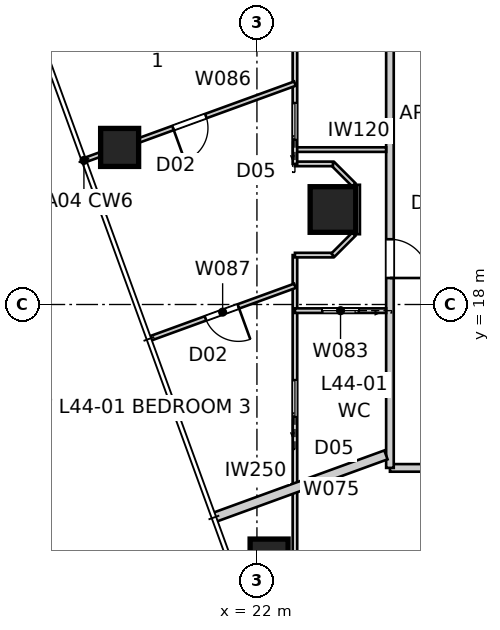
"""IFC4 building model, lengths in metres.
Left out: names, types, materials, properties, quantities, classifications, styles, units other than length and angle.
Written with IfcOpenShell. Run it as: python <this file> out.ifc"""

import sys

from ifc_helpers import new_model, si_unit, direction, frame, frame_2d, origin, origin_2d, place, context, subcontext, project, spatial, rectangle, extrude, element, fill, save


model = new_model("IFC4")
c1 = context("Model", 3, precision=1e-05, world=origin(), true_north=direction((0.0, 1.0)))
c2 = subcontext(c1, "Body", "Model", "MODEL_VIEW")
j1 = project(units=[si_unit("LENGTHUNIT", "METRE"), si_unit("PLANEANGLEUNIT", "RADIAN")], contexts=[c1])
p1 = place(None, origin())
s1 = spatial("IfcSite", under=j1, at=p1, CompositionType="ELEMENT")
p2 = place(p1, origin())
s2 = spatial("IfcBuilding", under=s1, at=p2, CompositionType="ELEMENT")
p3 = place(p2, frame((0.0, 0.0, 160.8)))
s3 = spatial("IfcBuildingStorey", under=s2, at=p3, CompositionType="ELEMENT", Elevation=160.8)
for number, where, z_axis, x_axis in (
    (1, (18.387, 22.134, 0.0), (0.0, 0.0, 1.0), (1.0, 0.0, 0.0)),
    (2, (22.32, 11.327, 0.0), (0.0, 0.0, 1.0), (1.0, 0.0, 0.0)),
):
    element("IfcColumn", number, at=place(p3, frame(where, z_axis=z_axis, x_axis=x_axis)), inside=s3, PredefinedType="COLUMN", context=c2, shape_type="SweptSolid", body=[
        extrude(rectangle(XDim=1.0, YDim=1.0, at=origin_2d()), origin(), (0.0, 0.0, 1.0), 3.4),
    ])
p4 = place(p3, frame((24.0, 20.5, 0.0), z_axis=(0.0, 0.0, 1.0), x_axis=(1.0, 0.0, 0.0)))
e3 = element("IfcColumn", 3, at=p4, inside=s3, PredefinedType="COLUMN", context=c2, shape_type="SweptSolid", body=[
    extrude(rectangle(XDim=1.2, YDim=1.2, at=origin_2d()), origin(), (0.0, 0.0, 1.0), 3.4),
])
p5 = place(p3, frame((25.5, 13.7, 0.0), z_axis=(0.0, 0.0, 1.0), x_axis=(1.0, 0.0, 0.0)))
e4 = element("IfcWall", 4, at=p5, inside=s3, PredefinedType="PARTITIONING", context=c2, shape_type="SweptSolid", body=[
    extrude(rectangle(XDim=5.258, YDim=0.2, at=frame_2d((2.629, 0.0))), origin(), (0.0, 0.0, 1.0), 3.25),
])
p6 = place(p5, frame((2.646, 0.0, 0.0)))
e5 = element("IfcOpeningElement", 5, at=p6, cuts=e4, PredefinedType="OPENING", context=c2, shape_type="SweptSolid", body=[
    extrude(rectangle(XDim=1.02, YDim=2.34, at=frame_2d((0.51, 1.17))), frame((0.0, 0.11, 0.0), z_axis=(0.0, -1.0, 0.0), x_axis=(1.0, 0.0, 0.0)), (0.0, 0.0, 1.0), 0.22),
])
p7 = place(p3, frame((25.5, 47.1, 0.0), z_axis=(0.0, 0.0, 1.0), x_axis=(0.0, -1.0, 0.0)))
e6 = element("IfcWall", 6, at=p7, inside=s3, PredefinedType="PARTITIONING", context=c2, shape_type="SweptSolid", body=[
    extrude(rectangle(XDim=33.4, YDim=0.2, at=frame_2d((16.7, 0.0))), origin(), (0.0, 0.0, 1.0), 3.25),
])
p8 = place(p7, frame((2.52, 0.0, 0.0)))
e7 = element("IfcOpeningElement", 7, at=p8, cuts=e6, PredefinedType="OPENING", context=c2, shape_type="SweptSolid", body=[
    extrude(rectangle(XDim=1.02, YDim=2.34, at=frame_2d((0.51, 1.17))), frame((0.0, 0.11, 0.0), z_axis=(0.0, -1.0, 0.0), x_axis=(1.0, 0.0, 0.0)), (0.0, 0.0, 1.0), 0.22),
])
p9 = place(p7, frame((27.383, 0.0, 0.0)))
e8 = element("IfcOpeningElement", 8, at=p9, cuts=e6, PredefinedType="OPENING", context=c2, shape_type="SweptSolid", body=[
    extrude(rectangle(XDim=1.02, YDim=2.1, at=frame_2d((0.51, 1.05))), frame((0.0, 0.11, 0.0), z_axis=(0.0, -1.0, 0.0), x_axis=(1.0, 0.0, 0.0)), (0.0, 0.0, 1.0), 0.22),
])
p10 = place(p3, frame((20.868, 12.395, 0.0), z_axis=(0.0, 0.0, 1.0), x_axis=(0.939677962656, 0.342060413521, 0.0)))
e9 = element("IfcWall", 9, at=p10, inside=s3, PredefinedType="PARTITIONING", context=c2, shape_type="SweptSolid", body=[
    extrude(rectangle(XDim=4.818, YDim=0.25, at=frame_2d((2.409, 0.0))), origin(), (0.0, 0.0, 1.0), 3.25),
])
p11 = place(p3, frame((23.0, 22.076, 0.0), z_axis=(0.0, 0.0, 1.0), x_axis=(1.0, 0.0, 0.0)))
e10 = element("IfcWall", 10, at=p11, inside=s3, PredefinedType="PARTITIONING", context=c2, shape_type="SweptSolid", body=[
    extrude(rectangle(XDim=2.4, YDim=0.12, at=frame_2d((1.2, 0.0))), origin(), (0.0, 0.0, 1.0), 3.25),
])
p12 = place(p3, frame((23.0, 11.2, 0.0), z_axis=(0.0, 0.0, 1.0), x_axis=(0.0, 1.0, 0.0)))
e11 = element("IfcWall", 11, at=p12, inside=s3, PredefinedType="PARTITIONING", context=c2, shape_type="SweptSolid", body=[
    extrude(rectangle(XDim=8.1, YDim=0.12, at=frame_2d((4.05, 0.0))), origin(), (0.0, 0.0, 1.0), 3.25),
])
p13 = place(p12, frame((3.849, 0.0, 0.0)))
e12 = element("IfcOpeningElement", 12, at=p13, cuts=e11, PredefinedType="OPENING", context=c2, shape_type="SweptSolid", body=[
    extrude(rectangle(XDim=0.96, YDim=2.1, at=frame_2d((0.48, 1.05))), frame((0.0, 0.07, 0.0), z_axis=(0.0, -1.0, 0.0), x_axis=(1.0, 0.0, 0.0)), (0.0, 0.0, 1.0), 0.14),
])
p14 = place(p3, frame((23.0, 19.3, 0.0), z_axis=(0.0, 0.0, 1.0), x_axis=(1.0, 0.0, 0.0)))
e13 = element("IfcWall", 13, at=p14, inside=s3, PredefinedType="PARTITIONING", context=c2, shape_type="SweptSolid", body=[
    extrude(rectangle(XDim=1.0, YDim=0.12, at=frame_2d((0.5, 0.0))), origin(), (0.0, 0.0, 1.0), 3.25),
])
p15 = place(p3, frame((24.0, 19.3, 0.0), z_axis=(0.0, 0.0, 1.0), x_axis=(0.707106781187, 0.707106781187, 0.0)))
e14 = element("IfcWall", 14, at=p15, inside=s3, PredefinedType="PARTITIONING", context=c2, shape_type="SweptSolid", body=[
    extrude(rectangle(XDim=0.778, YDim=0.12, at=frame_2d((0.389, 0.0))), origin(), (0.0, 0.0, 1.0), 3.25),
])
p16 = place(p3, frame((24.65, 19.85, 0.0), z_axis=(0.0, 0.0, 1.0), x_axis=(0.0, 1.0, 0.0)))
e15 = element("IfcWall", 15, at=p16, inside=s3, PredefinedType="PARTITIONING", context=c2, shape_type="SweptSolid", body=[
    extrude(rectangle(XDim=1.3, YDim=0.12, at=frame_2d((0.65, 0.0))), origin(), (0.0, 0.0, 1.0), 3.25),
])
p17 = place(p3, frame((24.55, 21.15, 0.0), z_axis=(0.0, 0.0, 1.0), x_axis=(-0.707106781187, 0.707106781187, 0.0)))
e16 = element("IfcWall", 16, at=p17, inside=s3, PredefinedType="PARTITIONING", context=c2, shape_type="SweptSolid", body=[
    extrude(rectangle(XDim=0.778, YDim=0.12, at=frame_2d((0.389, 0.0))), origin(), (0.0, 0.0, 1.0), 3.25),
])
p18 = place(p3, frame((24.0, 21.7, 0.0), z_axis=(0.0, 0.0, 1.0), x_axis=(-1.0, 0.0, 0.0)))
e17 = element("IfcWall", 17, at=p18, inside=s3, PredefinedType="PARTITIONING", context=c2, shape_type="SweptSolid", body=[
    extrude(rectangle(XDim=1.0, YDim=0.12, at=frame_2d((0.5, 0.0))), origin(), (0.0, 0.0, 1.0), 3.25),
])
p19 = place(p3, frame((23.0, 21.7, 0.0), z_axis=(0.0, 0.0, 1.0), x_axis=(0.0, 1.0, 0.0)))
e18 = element("IfcWall", 18, at=p19, inside=s3, PredefinedType="PARTITIONING", context=c2, shape_type="SweptSolid", body=[
    extrude(rectangle(XDim=19.512, YDim=0.12, at=frame_2d((9.756, 0.0))), origin(), (0.0, 0.0, 1.0), 2.55),
])
p20 = place(p19, frame((14.961, 0.0, 0.0)))
e19 = element("IfcOpeningElement", 19, at=p20, cuts=e18, PredefinedType="OPENING", context=c2, shape_type="SweptSolid", body=[
    extrude(rectangle(XDim=0.96, YDim=2.1, at=frame_2d((0.48, 1.05))), frame((0.0, 0.07, 0.0), z_axis=(0.0, -1.0, 0.0), x_axis=(1.0, 0.0, 0.0)), (0.0, 0.0, 1.0), 0.14),
])
p21 = place(p19, frame((0.641, 0.0, 0.0)))
e20 = element("IfcOpeningElement", 20, at=p21, cuts=e18, PredefinedType="OPENING", context=c2, shape_type="SweptSolid", body=[
    extrude(rectangle(XDim=0.96, YDim=2.1, at=frame_2d((0.48, 1.05))), frame((0.0, 0.07, 0.0), z_axis=(0.0, -1.0, 0.0), x_axis=(1.0, 0.0, 0.0)), (0.0, 0.0, 1.0), 0.14),
])
p22 = place(p19, frame((9.587, 0.0, 0.0)))
e21 = element("IfcOpeningElement", 21, at=p22, cuts=e18, PredefinedType="OPENING", context=c2, shape_type="SweptSolid", body=[
    extrude(rectangle(XDim=0.96, YDim=2.1, at=frame_2d((0.48, 1.05))), frame((0.0, 0.07, 0.0), z_axis=(0.0, -1.0, 0.0), x_axis=(1.0, 0.0, 0.0)), (0.0, 0.0, 1.0), 0.14),
])
p23 = place(p3, frame((25.4, 17.838, 0.0), z_axis=(0.0, 0.0, 1.0), x_axis=(-1.0, 0.0, 0.0)))
e22 = element("IfcWall", 22, at=p23, inside=s3, PredefinedType="PARTITIONING", context=c2, shape_type="SweptSolid", body=[
    extrude(rectangle(XDim=2.4, YDim=0.12, at=frame_2d((1.2, 0.0))), origin(), (0.0, 0.0, 1.0), 3.25),
])
p24 = place(p23, frame((0.72, 0.0, 0.0)))
e23 = element("IfcOpeningElement", 23, at=p24, cuts=e22, PredefinedType="OPENING", context=c2, shape_type="SweptSolid", body=[
    extrude(rectangle(XDim=0.96, YDim=2.1, at=frame_2d((0.48, 1.05))), frame((0.0, 0.07, 0.0), z_axis=(0.0, -1.0, 0.0), x_axis=(1.0, 0.0, 0.0)), (0.0, 0.0, 1.0), 0.14),
])
p25 = place(p3, frame((23.0, 23.812, 0.0), z_axis=(0.0, 0.0, 1.0), x_axis=(-0.939693791822, -0.342016925912, 0.0)))
e24 = element("IfcWall", 24, at=p25, inside=s3, PredefinedType="PARTITIONING", context=c2, shape_type="SweptSolid", body=[
    extrude(rectangle(XDim=5.869, YDim=0.12, at=frame_2d((2.935, 0.0))), origin(), (0.0, 0.0, 1.0), 3.25),
])
p26 = place(p25, frame((2.494, 0.0, 0.0)))
e25 = element("IfcOpeningElement", 25, at=p26, cuts=e24, PredefinedType="OPENING", context=c2, shape_type="SweptSolid", body=[
    extrude(rectangle(XDim=0.92, YDim=2.34, at=frame_2d((0.46, 1.17))), frame((0.0, 0.07, 0.0), z_axis=(0.0, -1.0, 0.0), x_axis=(1.0, 0.0, 0.0)), (0.0, 0.0, 1.0), 0.14),
])
p27 = place(p3, frame((23.0, 18.492, 0.0), z_axis=(0.0, 0.0, 1.0), x_axis=(-0.939682468191, -0.342048036063, 0.0)))
e26 = element("IfcWall", 26, at=p27, inside=s3, PredefinedType="PARTITIONING", context=c2, shape_type="SweptSolid", body=[
    extrude(rectangle(XDim=4.049, YDim=0.12, at=frame_2d((2.024, 0.0))), origin(), (0.0, 0.0, 1.0), 3.25),
])
p28 = place(p27, frame((1.584, 0.0, 0.0)))
e27 = element("IfcOpeningElement", 27, at=p28, cuts=e26, PredefinedType="OPENING", context=c2, shape_type="SweptSolid", body=[
    extrude(rectangle(XDim=0.92, YDim=2.34, at=frame_2d((0.46, 1.17))), frame((0.0, 0.07, 0.0), z_axis=(0.0, -1.0, 0.0), x_axis=(1.0, 0.0, 0.0)), (0.0, 0.0, 1.0), 0.14),
])
p29 = place(p9, origin())
e28 = element("IfcDoor", 28, at=p29, inside=s3, OperationType="SINGLE_SWING_RIGHT", PredefinedType="DOOR", context=c2, shape_type="SweptSolid", body=[
    extrude(rectangle(XDim=1.02, YDim=2.1, at=frame_2d((0.51, 1.05))), frame((0.0, 0.025, 0.0), z_axis=(0.0, -1.0, 0.0), x_axis=(1.0, 0.0, 0.0)), (0.0, 0.0, 1.0), 0.05),
])
fill(e8, e28)
p30 = place(p24, origin())
e29 = element("IfcDoor", 29, at=p30, inside=s3, OperationType="SLIDING_TO_LEFT", PredefinedType="DOOR", context=c2, shape_type="SweptSolid", body=[
    extrude(rectangle(XDim=0.96, YDim=2.1, at=frame_2d((0.48, 1.05))), frame((0.0, 0.025, 0.0), z_axis=(0.0, -1.0, 0.0), x_axis=(1.0, 0.0, 0.0)), (0.0, 0.0, 1.0), 0.05),
])
fill(e23, e29)
p31 = place(p13, origin())
e30 = element("IfcDoor", 30, at=p31, inside=s3, OperationType="SLIDING_TO_LEFT", PredefinedType="DOOR", context=c2, shape_type="SweptSolid", body=[
    extrude(rectangle(XDim=0.96, YDim=2.1, at=frame_2d((0.48, 1.05))), frame((0.0, 0.025, 0.0), z_axis=(0.0, -1.0, 0.0), x_axis=(1.0, 0.0, 0.0)), (0.0, 0.0, 1.0), 0.05),
])
fill(e12, e30)
p32 = place(p28, origin())
e31 = element("IfcDoor", 31, at=p32, inside=s3, OperationType="SINGLE_SWING_LEFT", PredefinedType="DOOR", context=c2, shape_type="SweptSolid", body=[
    extrude(rectangle(XDim=0.92, YDim=2.34, at=frame_2d((0.46, 1.17))), frame((0.0, 0.025, 0.0), z_axis=(0.0, -1.0, 0.0), x_axis=(1.0, 0.0, 0.0)), (0.0, 0.0, 1.0), 0.05),
])
fill(e27, e31)
p33 = place(p26, origin())
e32 = element("IfcDoor", 32, at=p33, inside=s3, OperationType="SINGLE_SWING_RIGHT", PredefinedType="DOOR", context=c2, shape_type="SweptSolid", body=[
    extrude(rectangle(XDim=0.92, YDim=2.34, at=frame_2d((0.46, 1.17))), frame((0.0, 0.025, 0.0), z_axis=(0.0, -1.0, 0.0), x_axis=(1.0, 0.0, 0.0)), (0.0, 0.0, 1.0), 0.05),
])
fill(e25, e32)
p34 = place(p21, origin())
e33 = element("IfcDoor", 33, at=p34, inside=s3, OperationType="SLIDING_TO_LEFT", PredefinedType="DOOR", context=c2, shape_type="SweptSolid", body=[
    extrude(rectangle(XDim=0.96, YDim=2.1, at=frame_2d((0.48, 1.05))), frame((0.0, 0.025, 0.0), z_axis=(0.0, -1.0, 0.0), x_axis=(1.0, 0.0, 0.0)), (0.0, 0.0, 1.0), 0.05),
])
fill(e20, e33)
save(model, sys.argv[1])
